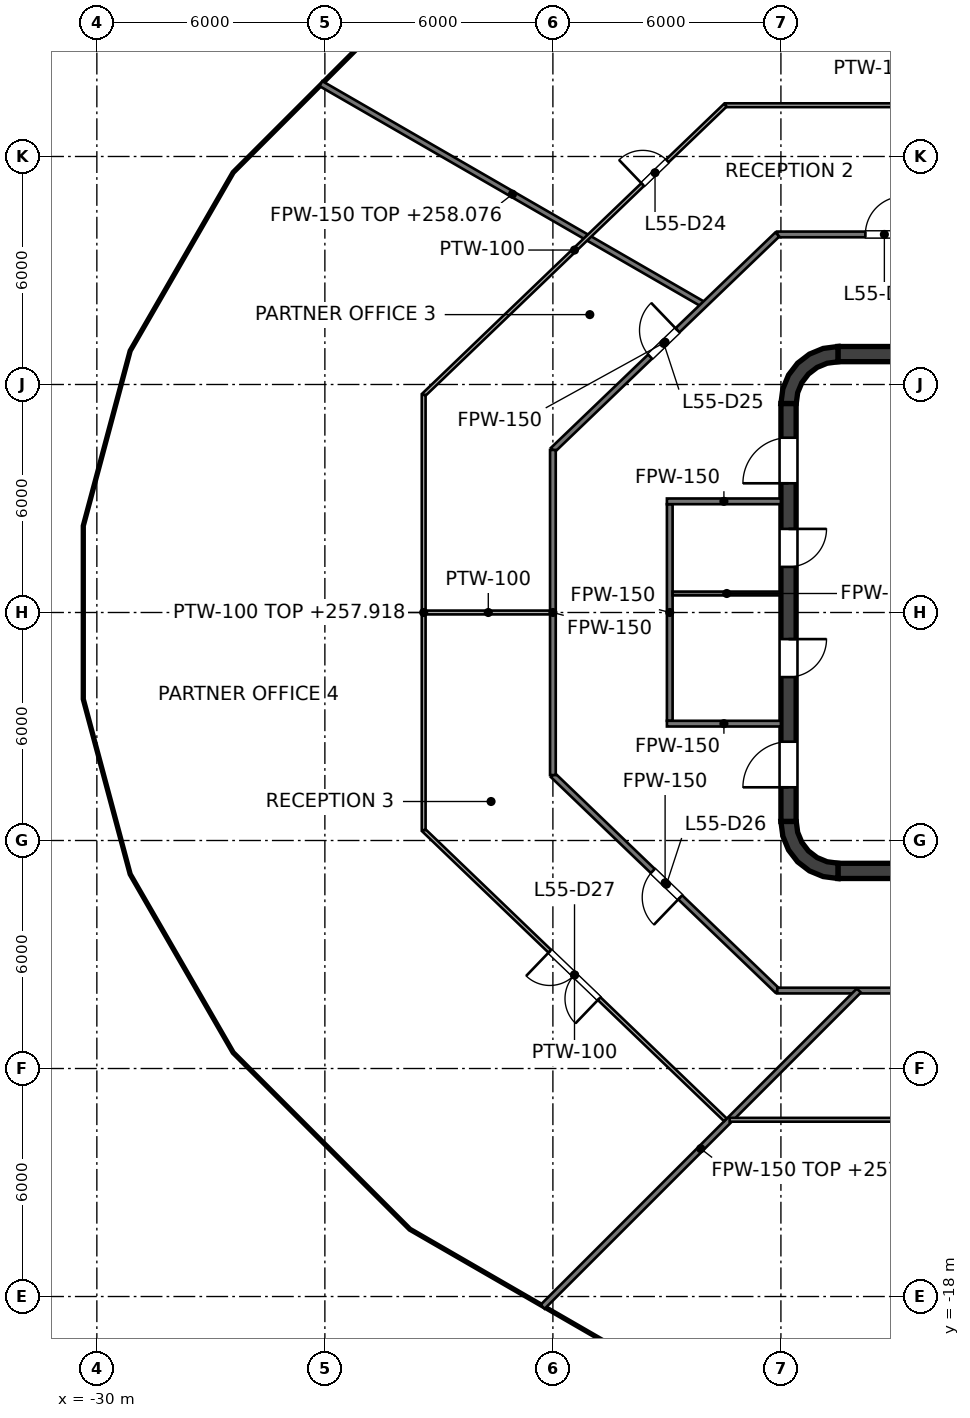
"""IFC4 building model, lengths in metres.
Left out: names, types, materials, properties, quantities, classifications, styles, units other than length and angle.
Written with IfcOpenShell. Run it as: python <this file> out.ifc"""

import sys

from ifc_helpers import new_model, si_unit, direction, frame, frame_2d, origin, place, context, subcontext, project, spatial, polyline, rectangle, outline, extrude, element, fill, save


model = new_model("IFC4")
c1 = context("Model", 3, precision=1e-05, world=origin(), true_north=direction((0.0, 1.0)))
c2 = subcontext(c1, "Body", "Model", "MODEL_VIEW")
j1 = project(units=[si_unit("LENGTHUNIT", "METRE"), si_unit("PLANEANGLEUNIT", "RADIAN")], contexts=[c1])
p1 = place(None, origin())
s1 = spatial("IfcSite", under=j1, at=p1, CompositionType="ELEMENT")
p2 = place(p1, origin())
s2 = spatial("IfcBuilding", under=s1, at=p2, CompositionType="ELEMENT")
p3 = place(p2, frame((0.0, 0.0, 255.0)))
s3 = spatial("IfcBuildingStorey", under=s2, at=p3, CompositionType="ELEMENT", Elevation=255.0)
for number, where, z_axis, x_axis in (
    (1, (-10.5, 6.8, 0.0), (0.0, 0.0, 1.0), (1.0, 0.0, 0.0)),
    (2, (-10.5, -6.8, 0.0), (0.0, 0.0, 1.0), (1.0, 0.0, 0.0)),
):
    element("IfcWall", number, at=place(p3, frame(where, z_axis=z_axis, x_axis=x_axis)), inside=s3, PredefinedType="SHEAR", context=c2, shape_type="SweptSolid", body=[
        extrude(rectangle(XDim=21.0, YDim=0.4, at=frame_2d((10.5, 0.0))), origin(), (0.0, 0.0, 1.0), 4.0),
    ])
p4 = place(p3, frame((-11.8, -5.5, 0.0), z_axis=(0.0, 0.0, 1.0), x_axis=(0.0, 1.0, 0.0)))
e3 = element("IfcWall", 3, at=p4, inside=s3, PredefinedType="SHEAR", context=c2, shape_type="SweptSolid", body=[
    extrude(rectangle(XDim=11.0, YDim=0.4, at=frame_2d((5.5, 0.0))), origin(), (0.0, 0.0, 1.0), 4.0),
])
p5 = place(p4, frame((3.8, 0.0, 0.0)))
e4 = element("IfcOpeningElement", 4, at=p5, cuts=e3, PredefinedType="OPENING", context=c2, shape_type="SweptSolid", body=[
    extrude(rectangle(XDim=1.0, YDim=2.1, at=frame_2d((0.5, 1.05))), frame((0.0, 0.2, 0.0), z_axis=(0.0, -1.0, 0.0), x_axis=(1.0, 0.0, 0.0)), (0.0, 0.0, 1.0), 0.4),
])
p6 = place(p4, frame((6.7, 0.0, 0.0)))
e5 = element("IfcOpeningElement", 5, at=p6, cuts=e3, PredefinedType="OPENING", context=c2, shape_type="SweptSolid", body=[
    extrude(rectangle(XDim=1.0, YDim=2.1, at=frame_2d((0.5, 1.05))), frame((0.0, 0.2, 0.0), z_axis=(0.0, -1.0, 0.0), x_axis=(1.0, 0.0, 0.0)), (0.0, 0.0, 1.0), 0.4),
])
p7 = place(p4, frame((0.9, 0.0, 0.0)))
e6 = element("IfcOpeningElement", 6, at=p7, cuts=e3, PredefinedType="OPENING", context=c2, shape_type="SweptSolid", body=[
    extrude(rectangle(XDim=1.2, YDim=2.1, at=frame_2d((0.6, 1.05))), frame((0.0, 0.2, 0.0), z_axis=(0.0, -1.0, 0.0), x_axis=(1.0, 0.0, 0.0)), (0.0, 0.0, 1.0), 0.4),
])
p8 = place(p4, frame((8.9, 0.0, 0.0)))
e7 = element("IfcOpeningElement", 7, at=p8, cuts=e3, PredefinedType="OPENING", context=c2, shape_type="SweptSolid", body=[
    extrude(rectangle(XDim=1.2, YDim=2.1, at=frame_2d((0.6, 1.05))), frame((0.0, 0.2, 0.0), z_axis=(0.0, -1.0, 0.0), x_axis=(1.0, 0.0, 0.0)), (0.0, 0.0, 1.0), 0.4),
])
p9 = place(p3, origin())
e8 = element("IfcWall", 8, at=p9, inside=s3, PredefinedType="SHEAR", context=c2, shape_type="SweptSolid", body=[
    extrude(outline(polyline([(-12.0, 5.5), (-11.596, 5.5), (-11.559, 5.784), (-11.45, 6.048), (-11.275, 6.275), (-11.048, 6.45), (-10.784, 6.559), (-10.5, 6.596), (-10.5, 7.0), (-10.888, 6.949), (-11.25, 6.799), (-11.561, 6.561), (-11.799, 6.25), (-11.949, 5.888), (-12.0, 5.5)])), origin(), (0.0, 0.0, 1.0), 4.0),
])
e9 = element("IfcWall", 9, at=p9, inside=s3, PredefinedType="SHEAR", context=c2, shape_type="SweptSolid", body=[
    extrude(outline(polyline([(-10.5, -7.0), (-10.5, -6.596), (-10.784, -6.559), (-11.048, -6.45), (-11.275, -6.275), (-11.45, -6.048), (-11.559, -5.784), (-11.596, -5.5), (-12.0, -5.5), (-11.949, -5.888), (-11.799, -6.25), (-11.561, -6.561), (-11.25, -6.799), (-10.888, -6.949), (-10.5, -7.0)])), origin(), (0.0, 0.0, 1.0), 4.0),
])
p10 = place(p3, frame((-14.925, -2.85, 0.0), z_axis=(0.0, 0.0, 1.0), x_axis=(0.0, 1.0, 0.0)))
e10 = element("IfcWall", 10, at=p10, inside=s3, PredefinedType="PARTITIONING", context=c2, shape_type="SweptSolid", body=[
    extrude(rectangle(XDim=5.7, YDim=0.15, at=frame_2d((2.85, 0.0))), origin(), (0.0, 0.0, 1.0), 2.918),
])
for number, where, z_axis, x_axis in (
    (11, (-15.0, 2.925, 0.0), (0.0, 0.0, 1.0), (1.0, 0.0, 0.0)),
    (12, (-15.0, -2.925, 0.0), (0.0, 0.0, 1.0), (1.0, 0.0, 0.0)),
):
    element("IfcWall", number, at=place(p3, frame(where, z_axis=z_axis, x_axis=x_axis)), inside=s3, PredefinedType="PARTITIONING", context=c2, shape_type="SweptSolid", body=[
        extrude(rectangle(XDim=3.0, YDim=0.15, at=frame_2d((1.5, 0.0))), origin(), (0.0, 0.0, 1.0), 2.918),
    ])
p11 = place(p3, frame((-14.85, 0.5, 0.0), z_axis=(0.0, 0.0, 1.0), x_axis=(1.0, 0.0, 0.0)))
e13 = element("IfcWall", 13, at=p11, inside=s3, PredefinedType="PARTITIONING", context=c2, shape_type="SweptSolid", body=[
    extrude(rectangle(XDim=2.85, YDim=0.1, at=frame_2d((1.425, 0.0))), origin(), (0.0, 0.0, 1.0), 3.85),
])
p12 = place(p3, frame((-18.0, -4.278, 0.0), z_axis=(0.0, 0.0, 1.0), x_axis=(0.721290181137, -0.692633001376, 0.0)))
e14 = element("IfcWall", 14, at=p12, inside=s3, PredefinedType="PARTITIONING", context=c2, shape_type="SweptSolid", body=[
    extrude(rectangle(XDim=8.187, YDim=0.15, at=frame_2d((4.094, 0.0))), origin(), (0.0, 0.0, 1.0), 2.918),
])
p13 = place(p12, frame((3.645, 0.0, 0.0)))
e15 = element("IfcOpeningElement", 15, at=p13, cuts=e14, PredefinedType="OPENING", context=c2, shape_type="SweptSolid", body=[
    extrude(rectangle(XDim=1.0, YDim=2.1, at=frame_2d((0.5, 1.05))), frame((0.0, 0.075, 0.0), z_axis=(0.0, -1.0, 0.0), x_axis=(1.0, 0.0, 0.0)), (0.0, 0.0, 1.0), 0.15),
])
p14 = place(p3, frame((-24.104, 13.917, 0.0), z_axis=(0.0, 0.0, 1.0), x_axis=(0.865998705175, -0.500046240497, 0.0)))
e16 = element("IfcWall", 16, at=p14, inside=s3, PredefinedType="PARTITIONING", context=c2, shape_type="SweptSolid", body=[
    extrude(rectangle(XDim=11.64, YDim=0.15, at=frame_2d((5.82, 0.0))), origin(), (0.0, 0.0, 1.0), 3.076),
])
p15 = place(p3, frame((-12.095, -9.949, 0.0), z_axis=(0.0, 0.0, 1.0), x_axis=(1.0, 0.0, 0.0)))
e17 = element("IfcWall", 17, at=p15, inside=s3, PredefinedType="PARTITIONING", context=c2, shape_type="SweptSolid", body=[
    extrude(rectangle(XDim=24.19, YDim=0.15, at=frame_2d((12.095, 0.0))), origin(), (0.0, 0.0, 1.0), 2.927),
])
p16 = place(p15, frame((4.086, 0.0, 0.0)))
e18 = element("IfcOpeningElement", 18, at=p16, cuts=e17, PredefinedType="OPENING", context=c2, shape_type="SweptSolid", body=[
    extrude(rectangle(XDim=1.0, YDim=2.1, at=frame_2d((0.5, 1.05))), frame((0.0, 0.075, 0.0), z_axis=(0.0, -1.0, 0.0), x_axis=(1.0, 0.0, 0.0)), (0.0, 0.0, 1.0), 0.15),
])
p17 = place(p15, frame((9.061, 0.0, 0.0)))
e19 = element("IfcOpeningElement", 19, at=p17, cuts=e17, PredefinedType="OPENING", context=c2, shape_type="SweptSolid", body=[
    extrude(rectangle(XDim=1.0, YDim=2.1, at=frame_2d((0.5, 1.05))), frame((0.0, 0.075, 0.0), z_axis=(0.0, -1.0, 0.0), x_axis=(1.0, 0.0, 0.0)), (0.0, 0.0, 1.0), 0.15),
])
p18 = place(p15, frame((14.417, 0.0, 0.0)))
e20 = element("IfcOpeningElement", 20, at=p18, cuts=e17, PredefinedType="OPENING", context=c2, shape_type="SweptSolid", body=[
    extrude(rectangle(XDim=1.0, YDim=2.1, at=frame_2d((0.5, 1.05))), frame((0.0, 0.075, 0.0), z_axis=(0.0, -1.0, 0.0), x_axis=(1.0, 0.0, 0.0)), (0.0, 0.0, 1.0), 0.15),
])
p19 = place(p3, frame((-12.095, 9.949, 0.0), z_axis=(0.0, 0.0, 1.0), x_axis=(1.0, 0.0, 0.0)))
e21 = element("IfcWall", 21, at=p19, inside=s3, PredefinedType="PARTITIONING", context=c2, shape_type="SweptSolid", body=[
    extrude(rectangle(XDim=24.19, YDim=0.15, at=frame_2d((12.095, 0.0))), origin(), (0.0, 0.0, 1.0), 2.927),
])
p20 = place(p19, frame((16.933, 0.0, 0.0)))
e22 = element("IfcOpeningElement", 22, at=p20, cuts=e21, PredefinedType="OPENING", context=c2, shape_type="SweptSolid", body=[
    extrude(rectangle(XDim=1.0, YDim=2.1, at=frame_2d((0.5, 1.05))), frame((0.0, 0.075, 0.0), z_axis=(0.0, -1.0, 0.0), x_axis=(1.0, 0.0, 0.0)), (0.0, 0.0, 1.0), 0.15),
])
p21 = place(p19, frame((10.255, 0.0, 0.0)))
e23 = element("IfcOpeningElement", 23, at=p21, cuts=e21, PredefinedType="OPENING", context=c2, shape_type="SweptSolid", body=[
    extrude(rectangle(XDim=1.0, YDim=2.1, at=frame_2d((0.5, 1.05))), frame((0.0, 0.075, 0.0), z_axis=(0.0, -1.0, 0.0), x_axis=(1.0, 0.0, 0.0)), (0.0, 0.0, 1.0), 0.15),
])
p22 = place(p19, frame((6.978, 0.0, 0.0)))
e24 = element("IfcOpeningElement", 24, at=p22, cuts=e21, PredefinedType="OPENING", context=c2, shape_type="SweptSolid", body=[
    extrude(rectangle(XDim=1.0, YDim=2.1, at=frame_2d((0.5, 1.05))), frame((0.0, 0.075, 0.0), z_axis=(0.0, -1.0, 0.0), x_axis=(1.0, 0.0, 0.0)), (0.0, 0.0, 1.0), 0.15),
])
p23 = place(p19, frame((2.317, 0.0, 0.0)))
e25 = element("IfcOpeningElement", 25, at=p23, cuts=e21, PredefinedType="OPENING", context=c2, shape_type="SweptSolid", body=[
    extrude(rectangle(XDim=1.0, YDim=2.1, at=frame_2d((0.5, 1.05))), frame((0.0, 0.075, 0.0), z_axis=(0.0, -1.0, 0.0), x_axis=(1.0, 0.0, 0.0)), (0.0, 0.0, 1.0), 0.15),
])
p24 = place(p3, frame((-18.0, 4.278, 0.0), z_axis=(0.0, 0.0, 1.0), x_axis=(0.721334282166, 0.692587072773, 0.0)))
e26 = element("IfcWall", 26, at=p24, inside=s3, PredefinedType="PARTITIONING", context=c2, shape_type="SweptSolid", body=[
    extrude(rectangle(XDim=8.187, YDim=0.15, at=frame_2d((4.094, 0.0))), origin(), (0.0, 0.0, 1.0), 2.918),
])
p25 = place(p24, frame((3.545, 0.0, 0.0)))
e27 = element("IfcOpeningElement", 27, at=p25, cuts=e26, PredefinedType="OPENING", context=c2, shape_type="SweptSolid", body=[
    extrude(rectangle(XDim=1.0, YDim=2.1, at=frame_2d((0.5, 1.05))), frame((0.0, 0.075, 0.0), z_axis=(0.0, -1.0, 0.0), x_axis=(1.0, 0.0, 0.0)), (0.0, 0.0, 1.0), 0.15),
])
p26 = place(p3, frame((-18.27, -18.27, 0.0), z_axis=(0.0, 0.0, 1.0), x_axis=(0.707106781187, 0.707106781187, 0.0)))
e28 = element("IfcWall", 28, at=p26, inside=s3, PredefinedType="PARTITIONING", context=c2, shape_type="SweptSolid", body=[
    extrude(rectangle(XDim=11.768, YDim=0.15, at=frame_2d((5.884, 0.0))), origin(), (0.0, 0.0, 1.0), 2.995),
])
p27 = place(p3, frame((-18.0, -4.278, 0.0), z_axis=(0.0, 0.0, 1.0), x_axis=(0.0, 1.0, 0.0)))
e29 = element("IfcWall", 29, at=p27, inside=s3, PredefinedType="PARTITIONING", context=c2, shape_type="SweptSolid", body=[
    extrude(rectangle(XDim=8.556, YDim=0.15, at=frame_2d((4.278, 0.0))), origin(), (0.0, 0.0, 1.0), 2.918),
])
p28 = place(p3, frame((-21.4, -5.727, 0.0), z_axis=(0.0, 0.0, 1.0), x_axis=(0.72128312314, -0.692640351317, 0.0)))
e30 = element("IfcWall", 30, at=p28, inside=s3, PredefinedType="PARTITIONING", context=c2, shape_type="SweptSolid", body=[
    extrude(rectangle(XDim=11.004, YDim=0.1, at=frame_2d((5.502, 0.0))), origin(), (0.0, 0.0, 1.0), 2.927),
])
p29 = place(p28, frame((4.603, 0.0, 0.0)))
e31 = element("IfcOpeningElement", 31, at=p29, cuts=e30, PredefinedType="OPENING", context=c2, shape_type="SweptSolid", body=[
    extrude(rectangle(XDim=1.8, YDim=2.1, at=frame_2d((0.9, 1.05))), frame((0.0, 0.05, 0.0), z_axis=(0.0, -1.0, 0.0), x_axis=(1.0, 0.0, 0.0)), (0.0, 0.0, 1.0), 0.1),
])
p30 = place(p3, frame((-13.349, -13.349, 0.0), z_axis=(0.0, 0.0, 1.0), x_axis=(1.0, 0.0, 0.0)))
e32 = element("IfcWall", 32, at=p30, inside=s3, PredefinedType="PARTITIONING", context=c2, shape_type="SweptSolid", body=[
    extrude(rectangle(XDim=26.812, YDim=0.1, at=frame_2d((13.406, 0.0))), origin(), (0.0, 0.0, 1.0), 2.927),
])
p31 = place(p30, frame((9.448, 0.0, 0.0)))
e33 = element("IfcOpeningElement", 33, at=p31, cuts=e32, PredefinedType="OPENING", context=c2, shape_type="SweptSolid", body=[
    extrude(rectangle(XDim=0.9, YDim=2.1, at=frame_2d((0.45, 1.05))), frame((0.0, 0.05, 0.0), z_axis=(0.0, -1.0, 0.0), x_axis=(1.0, 0.0, 0.0)), (0.0, 0.0, 1.0), 0.1),
])
p32 = place(p3, frame((-21.4, 0.0, 0.0), z_axis=(0.0, 0.0, 1.0), x_axis=(1.0, 0.0, 0.0)))
e34 = element("IfcWall", 34, at=p32, inside=s3, PredefinedType="PARTITIONING", context=c2, shape_type="SweptSolid", body=[
    extrude(rectangle(XDim=3.4, YDim=0.1, at=frame_2d((1.7, 0.0))), origin(), (0.0, 0.0, 1.0), 2.927),
])
p33 = place(p3, frame((-13.463, 13.349, 0.0), z_axis=(0.0, 0.0, 1.0), x_axis=(1.0, 0.0, 0.0)))
e35 = element("IfcWall", 35, at=p33, inside=s3, PredefinedType="PARTITIONING", context=c2, shape_type="SweptSolid", body=[
    extrude(rectangle(XDim=26.926, YDim=0.1, at=frame_2d((13.463, 0.0))), origin(), (0.0, 0.0, 1.0), 2.927),
])
p34 = place(p33, frame((19.31, 0.0, 0.0)))
e36 = element("IfcOpeningElement", 36, at=p34, cuts=e35, PredefinedType="OPENING", context=c2, shape_type="SweptSolid", body=[
    extrude(rectangle(XDim=1.8, YDim=2.1, at=frame_2d((0.9, 1.05))), frame((0.0, 0.05, 0.0), z_axis=(0.0, -1.0, 0.0), x_axis=(1.0, 0.0, 0.0)), (0.0, 0.0, 1.0), 0.1),
])
p35 = place(p3, frame((-21.4, 5.727, 0.0), z_axis=(0.0, 0.0, 1.0), x_axis=(0.721272039069, 0.692651893563, 0.0)))
e37 = element("IfcWall", 37, at=p35, inside=s3, PredefinedType="PARTITIONING", context=c2, shape_type="SweptSolid", body=[
    extrude(rectangle(XDim=11.004, YDim=0.1, at=frame_2d((5.502, 0.0))), origin(), (0.0, 0.0, 1.0), 2.927),
])
p36 = place(p35, frame((7.99, 0.0, 0.0)))
e38 = element("IfcOpeningElement", 38, at=p36, cuts=e37, PredefinedType="OPENING", context=c2, shape_type="SweptSolid", body=[
    extrude(rectangle(XDim=0.9, YDim=2.1, at=frame_2d((0.45, 1.05))), frame((0.0, 0.05, 0.0), z_axis=(0.0, -1.0, 0.0), x_axis=(1.0, 0.0, 0.0)), (0.0, 0.0, 1.0), 0.1),
])
p37 = place(p3, frame((-21.4, -5.727, 0.0), z_axis=(0.0, 0.0, 1.0), x_axis=(0.0, 1.0, 0.0)))
e39 = element("IfcWall", 39, at=p37, inside=s3, PredefinedType="PARTITIONING", context=c2, shape_type="SweptSolid", body=[
    extrude(rectangle(XDim=11.454, YDim=0.1, at=frame_2d((5.727, 0.0))), origin(), (0.0, 0.0, 1.0), 2.918),
])
p38 = place(p5, origin())
e40 = element("IfcDoor", 40, at=p38, inside=s3, OperationType="SINGLE_SWING_RIGHT", PredefinedType="DOOR", context=c2, shape_type="SweptSolid", body=[
    extrude(rectangle(XDim=1.0, YDim=2.1, at=frame_2d((0.5, 1.05))), frame((0.0, 0.025, 0.0), z_axis=(0.0, -1.0, 0.0), x_axis=(1.0, 0.0, 0.0)), (0.0, 0.0, 1.0), 0.05),
])
fill(e4, e40)
p39 = place(p6, origin())
e41 = element("IfcDoor", 41, at=p39, inside=s3, OperationType="SINGLE_SWING_RIGHT", PredefinedType="DOOR", context=c2, shape_type="SweptSolid", body=[
    extrude(rectangle(XDim=1.0, YDim=2.1, at=frame_2d((0.5, 1.05))), frame((0.0, 0.025, 0.0), z_axis=(0.0, -1.0, 0.0), x_axis=(1.0, 0.0, 0.0)), (0.0, 0.0, 1.0), 0.05),
])
fill(e5, e41)
p40 = place(p7, origin())
e42 = element("IfcDoor", 42, at=p40, inside=s3, OperationType="SINGLE_SWING_LEFT", PredefinedType="DOOR", context=c2, shape_type="SweptSolid", body=[
    extrude(rectangle(XDim=1.2, YDim=2.1, at=frame_2d((0.6, 1.05))), frame((0.0, 0.025, 0.0), z_axis=(0.0, -1.0, 0.0), x_axis=(1.0, 0.0, 0.0)), (0.0, 0.0, 1.0), 0.05),
])
fill(e6, e42)
p41 = place(p8, origin())
e43 = element("IfcDoor", 43, at=p41, inside=s3, OperationType="SINGLE_SWING_LEFT", PredefinedType="DOOR", context=c2, shape_type="SweptSolid", body=[
    extrude(rectangle(XDim=1.2, YDim=2.1, at=frame_2d((0.6, 1.05))), frame((0.0, 0.025, 0.0), z_axis=(0.0, -1.0, 0.0), x_axis=(1.0, 0.0, 0.0)), (0.0, 0.0, 1.0), 0.05),
])
fill(e7, e43)
p42 = place(p23, origin())
e44 = element("IfcDoor", 44, at=p42, inside=s3, OperationType="SINGLE_SWING_RIGHT", PredefinedType="DOOR", context=c2, shape_type="SweptSolid", body=[
    extrude(rectangle(XDim=1.0, YDim=2.1, at=frame_2d((0.5, 1.05))), frame((0.0, 0.025, 0.0), z_axis=(0.0, -1.0, 0.0), x_axis=(1.0, 0.0, 0.0)), (0.0, 0.0, 1.0), 0.05),
])
fill(e25, e44)
p43 = place(p36, origin())
e45 = element("IfcDoor", 45, at=p43, inside=s3, OperationType="SINGLE_SWING_LEFT", PredefinedType="DOOR", context=c2, shape_type="SweptSolid", body=[
    extrude(rectangle(XDim=0.9, YDim=2.1, at=frame_2d((0.45, 1.05))), frame((0.0, 0.025, 0.0), z_axis=(0.0, -1.0, 0.0), x_axis=(1.0, 0.0, 0.0)), (0.0, 0.0, 1.0), 0.05),
])
fill(e38, e45)
p44 = place(p25, origin())
e46 = element("IfcDoor", 46, at=p44, inside=s3, OperationType="SINGLE_SWING_RIGHT", PredefinedType="DOOR", context=c2, shape_type="SweptSolid", body=[
    extrude(rectangle(XDim=1.0, YDim=2.1, at=frame_2d((0.5, 1.05))), frame((0.0, 0.025, 0.0), z_axis=(0.0, -1.0, 0.0), x_axis=(1.0, 0.0, 0.0)), (0.0, 0.0, 1.0), 0.05),
])
fill(e27, e46)
p45 = place(p13, origin())
e47 = element("IfcDoor", 47, at=p45, inside=s3, OperationType="SINGLE_SWING_RIGHT", PredefinedType="DOOR", context=c2, shape_type="SweptSolid", body=[
    extrude(rectangle(XDim=1.0, YDim=2.1, at=frame_2d((0.5, 1.05))), frame((0.0, 0.025, 0.0), z_axis=(0.0, -1.0, 0.0), x_axis=(1.0, 0.0, 0.0)), (0.0, 0.0, 1.0), 0.05),
])
fill(e15, e47)
p46 = place(p29, origin())
e48 = element("IfcDoor", 48, at=p46, inside=s3, OperationType="DOUBLE_DOOR_SINGLE_SWING", PredefinedType="DOOR", context=c2, shape_type="SweptSolid", body=[
    extrude(rectangle(XDim=1.8, YDim=2.1, at=frame_2d((0.9, 1.05))), frame((0.0, 0.025, 0.0), z_axis=(0.0, -1.0, 0.0), x_axis=(1.0, 0.0, 0.0)), (0.0, 0.0, 1.0), 0.05),
])
fill(e31, e48)
save(model, sys.argv[1])
